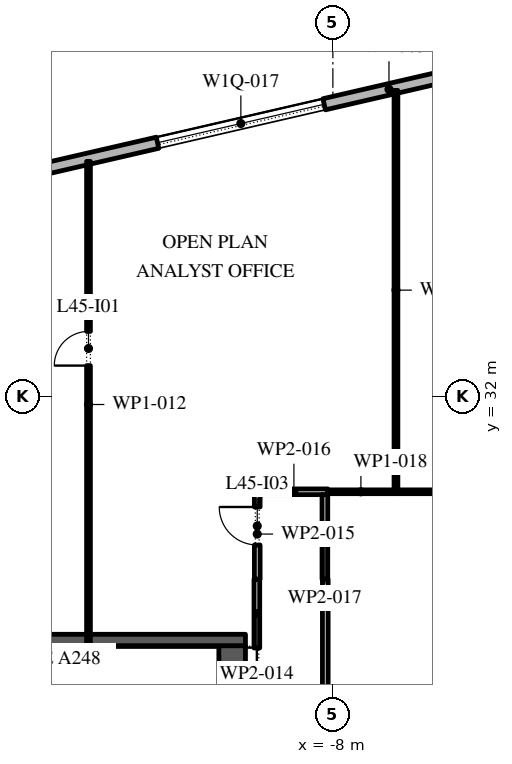
"""IFC4 building model, lengths in metres.
Left out: names, types, materials, properties, quantities, classifications, styles, units other than length and angle.
Written with IfcOpenShell. Run it as: python <this file> out.ifc"""

import sys

from ifc_helpers import new_model, si_unit, direction, frame, frame_2d, origin, place, context, subcontext, project, spatial, rectangle, extrude, element, fill, save


model = new_model("IFC4")
c1 = context("Model", 3, precision=1e-05, world=origin(), true_north=direction((0.0, 1.0)))
c2 = subcontext(c1, "Body", "Model", "MODEL_VIEW")
j1 = project(units=[si_unit("LENGTHUNIT", "METRE"), si_unit("PLANEANGLEUNIT", "RADIAN")], contexts=[c1])
p1 = place(None, origin())
s1 = spatial("IfcSite", under=j1, at=p1, CompositionType="ELEMENT")
p2 = place(p1, origin())
s2 = spatial("IfcBuilding", under=s1, at=p2, CompositionType="ELEMENT")
p3 = place(p2, frame((0.0, 0.0, 205.2)))
s3 = spatial("IfcBuildingStorey", under=s2, at=p3, CompositionType="ELEMENT", Elevation=205.2)
p4 = place(p3, frame((17.592, 45.657, 0.0), z_axis=(0.0, 0.0, 1.0), x_axis=(-0.974370243697, -0.224950279389, 0.0)))
e1 = element("IfcWall", 1, at=p4, inside=s3, PredefinedType="STANDARD", context=c2, shape_type="SweptSolid", body=[
    extrude(rectangle(XDim=49.5, YDim=0.3, at=frame_2d((24.75, 0.0))), origin(), (0.0, 0.0, 1.0), 4.0),
])
p5 = place(p4, frame((2.8, 0.0, 0.0)))
e2 = element("IfcOpeningElement", 2, at=p5, cuts=e1, PredefinedType="OPENING", context=c2, shape_type="SweptSolid", body=[
    extrude(rectangle(XDim=2.4, YDim=3.5, at=frame_2d((1.2, 1.75))), frame((0.0, 0.16, 0.0), z_axis=(0.0, -1.0, 0.0), x_axis=(1.0, 0.0, 0.0)), (0.0, 0.0, 1.0), 0.32),
])
p6 = place(p4, frame((9.9, 0.0, 0.45)))
e3 = element("IfcOpeningElement", 3, at=p6, cuts=e1, PredefinedType="OPENING", context=c2, shape_type="SweptSolid", body=[
    extrude(rectangle(XDim=4.5, YDim=2.45, at=frame_2d((2.25, 1.225))), frame((0.0, 0.16, 0.0), z_axis=(0.0, -1.0, 0.0), x_axis=(1.0, 0.0, 0.0)), (0.0, 0.0, 1.0), 0.32),
])
p7 = place(p4, frame((18.2, 0.0, 0.45)))
e4 = element("IfcOpeningElement", 4, at=p7, cuts=e1, PredefinedType="OPENING", context=c2, shape_type="SweptSolid", body=[
    extrude(rectangle(XDim=4.5, YDim=2.45, at=frame_2d((2.25, 1.225))), frame((0.0, 0.16, 0.0), z_axis=(0.0, -1.0, 0.0), x_axis=(1.0, 0.0, 0.0)), (0.0, 0.0, 1.0), 0.32),
])
p8 = place(p4, frame((26.5, 0.0, 0.45)))
e5 = element("IfcOpeningElement", 5, at=p8, cuts=e1, PredefinedType="OPENING", context=c2, shape_type="SweptSolid", body=[
    extrude(rectangle(XDim=4.5, YDim=2.45, at=frame_2d((2.25, 1.225))), frame((0.0, 0.16, 0.0), z_axis=(0.0, -1.0, 0.0), x_axis=(1.0, 0.0, 0.0)), (0.0, 0.0, 1.0), 0.32),
])
p9 = place(p4, frame((35.85, 0.0, 0.0)))
e6 = element("IfcOpeningElement", 6, at=p9, cuts=e1, PredefinedType="OPENING", context=c2, shape_type="SweptSolid", body=[
    extrude(rectangle(XDim=2.4, YDim=3.5, at=frame_2d((1.2, 1.75))), frame((0.0, 0.16, 0.0), z_axis=(0.0, -1.0, 0.0), x_axis=(1.0, 0.0, 0.0)), (0.0, 0.0, 1.0), 0.32),
])
p10 = place(p4, frame((43.1, 0.0, 0.45)))
e7 = element("IfcOpeningElement", 7, at=p10, cuts=e1, PredefinedType="OPENING", context=c2, shape_type="SweptSolid", body=[
    extrude(rectangle(XDim=4.5, YDim=2.575, at=frame_2d((2.25, 1.288))), frame((0.0, 0.16, 0.0), z_axis=(0.0, -1.0, 0.0), x_axis=(1.0, 0.0, 0.0)), (0.0, 0.0, 1.0), 0.32),
])
p11 = place(p3, frame((-10.65, -2.45, 0.0), z_axis=(0.0, 0.0, 1.0), x_axis=(0.0, 1.0, 0.0)))
e8 = element("IfcWall", 8, at=p11, inside=s3, PredefinedType="SHEAR", context=c2, shape_type="SweptSolid", body=[
    extrude(rectangle(XDim=27.9, YDim=0.7, at=frame_2d((13.95, 0.0))), origin(), (0.0, 0.0, 1.0), 4.0),
])
p12 = place(p11, frame((23.65, 0.0, 0.0)))
e9 = element("IfcOpeningElement", 9, at=p12, cuts=e8, PredefinedType="OPENING", context=c2, shape_type="SweptSolid", body=[
    extrude(rectangle(XDim=2.4, YDim=2.1, at=frame_2d((1.2, 1.05))), frame((0.0, 0.36, 0.0), z_axis=(0.0, -1.0, 0.0), x_axis=(1.0, 0.0, 0.0)), (0.0, 0.0, 1.0), 0.72),
])
p13 = place(p11, frame((1.087, 0.0, 0.0)))
e10 = element("IfcOpeningElement", 10, at=p13, cuts=e8, PredefinedType="OPENING", context=c2, shape_type="SweptSolid", body=[
    extrude(rectangle(XDim=0.9, YDim=2.1, at=frame_2d((0.45, 1.05))), frame((0.0, 0.36, 0.0), z_axis=(0.0, -1.0, 0.0), x_axis=(1.0, 0.0, 0.0)), (0.0, 0.0, 1.0), 0.72),
])
p14 = place(p11, frame((4.262, 0.0, 0.0)))
e11 = element("IfcOpeningElement", 11, at=p14, cuts=e8, PredefinedType="OPENING", context=c2, shape_type="SweptSolid", body=[
    extrude(rectangle(XDim=1.0, YDim=2.1, at=frame_2d((0.5, 1.05))), frame((0.0, 0.36, 0.0), z_axis=(0.0, -1.0, 0.0), x_axis=(1.0, 0.0, 0.0)), (0.0, 0.0, 1.0), 0.72),
])
p15 = place(p3, frame((-21.7, 25.6, 0.0), z_axis=(0.0, 0.0, 1.0), x_axis=(1.0, 0.0, 0.0)))
e12 = element("IfcWall", 12, at=p15, inside=s3, PredefinedType="SHEAR", context=c2, shape_type="SweptSolid", body=[
    extrude(rectangle(XDim=11.4, YDim=0.3, at=frame_2d((5.7, 0.0))), origin(), (0.0, 0.0, 1.0), 4.0),
])
p16 = place(p3, frame((-14.43, 38.193, 0.0), z_axis=(0.0, 0.0, 1.0), x_axis=(0.0, -1.0, 0.0)))
e13 = element("IfcWall", 13, at=p16, inside=s3, PredefinedType="PARTITIONING", context=c2, shape_type="SweptSolid", body=[
    extrude(rectangle(XDim=12.793, YDim=0.1, at=frame_2d((6.396, 0.0))), origin(), (0.0, 0.0, 1.0), 4.0),
])
p17 = place(p16, frame((4.473, 0.0, 0.0)))
e14 = element("IfcOpeningElement", 14, at=p17, cuts=e13, PredefinedType="OPENING", context=c2, shape_type="SweptSolid", body=[
    extrude(rectangle(XDim=0.9, YDim=2.1, at=frame_2d((0.45, 1.05))), frame((0.0, 0.06, 0.0), z_axis=(0.0, -1.0, 0.0), x_axis=(1.0, 0.0, 0.0)), (0.0, 0.0, 1.0), 0.12),
])
p18 = place(p3, frame((-10.0, 25.39, 0.0), z_axis=(0.0, 0.0, 1.0), x_axis=(0.0, 1.0, 0.0)))
e15 = element("IfcWall", 15, at=p18, inside=s3, PredefinedType="PARTITIONING", context=c2, shape_type="SweptSolid", body=[
    extrude(rectangle(XDim=1.81, YDim=0.15, at=frame_2d((0.905, 0.0))), origin(), (0.0, 0.0, 1.0), 4.0),
])
p19 = place(p3, frame((-9.99, 27.2, 0.0), z_axis=(0.0, 0.0, 1.0), x_axis=(0.0, 1.0, 0.0)))
e16 = element("IfcWall", 16, at=p19, inside=s3, PredefinedType="PARTITIONING", context=c2, shape_type="SweptSolid", body=[
    extrude(rectangle(XDim=2.375, YDim=0.15, at=frame_2d((1.188, 0.0))), origin(), (0.0, 0.0, 1.0), 4.0),
])
p20 = place(p19, frame((0.9, 0.0, 0.0)))
e17 = element("IfcOpeningElement", 17, at=p20, cuts=e16, PredefinedType="OPENING", context=c2, shape_type="SweptSolid", body=[
    extrude(rectangle(XDim=1.0, YDim=2.1, at=frame_2d((0.5, 1.05))), frame((0.0, 0.085, 0.0), z_axis=(0.0, -1.0, 0.0), x_axis=(1.0, 0.0, 0.0)), (0.0, 0.0, 1.0), 0.17),
])
p21 = place(p3, frame((-9.915, 29.5, 0.0), z_axis=(0.0, 0.0, 1.0), x_axis=(1.0, 0.0, 0.0)))
e18 = element("IfcWall", 18, at=p21, inside=s3, PredefinedType="PARTITIONING", context=c2, shape_type="SweptSolid", body=[
    extrude(rectangle(XDim=1.78, YDim=0.15, at=frame_2d((0.89, 0.0))), origin(), (0.0, 0.0, 1.0), 4.0),
])
p22 = place(p3, frame((-8.21, 29.425, 0.0), z_axis=(0.0, 0.0, 1.0), x_axis=(0.0, -1.0, 0.0)))
e19 = element("IfcWall", 19, at=p22, inside=s3, PredefinedType="PARTITIONING", context=c2, shape_type="SweptSolid", body=[
    extrude(rectangle(XDim=2.225, YDim=0.15, at=frame_2d((1.113, 0.0))), origin(), (0.0, 0.0, 1.0), 4.0),
])
p23 = place(p3, frame((-8.135, 29.5, 0.0), z_axis=(0.0, 0.0, 1.0), x_axis=(1.0, 0.0, 0.0)))
e20 = element("IfcWall", 20, at=p23, inside=s3, PredefinedType="PARTITIONING", context=c2, shape_type="SweptSolid", body=[
    extrude(rectangle(XDim=1.745, YDim=0.1, at=frame_2d((0.873, 0.0))), origin(), (0.0, 0.0, 1.0), 4.0),
])
p24 = place(p3, frame((-8.2, 27.2, 0.0), z_axis=(0.0, 0.0, 1.0), x_axis=(0.0, -1.0, 0.0)))
e21 = element("IfcWall", 21, at=p24, inside=s3, PredefinedType="PARTITIONING", context=c2, shape_type="SweptSolid", body=[
    extrude(rectangle(XDim=8.125, YDim=0.15, at=frame_2d((4.062, 0.0))), origin(), (0.0, 0.0, 1.0), 4.0),
])
p25 = place(p3, frame((-6.39, 29.5, 0.0), z_axis=(0.0, 0.0, 1.0), x_axis=(1.0, 0.0, 0.0)))
e22 = element("IfcWall", 22, at=p25, inside=s3, PredefinedType="PARTITIONING", context=c2, shape_type="SweptSolid", body=[
    extrude(rectangle(XDim=5.475, YDim=0.1, at=frame_2d((2.737, 0.0))), origin(), (0.0, 0.0, 1.0), 4.0),
])
p26 = place(p3, frame((-6.34, 40.061, 0.0), z_axis=(0.0, 0.0, 1.0), x_axis=(0.0, -1.0, 0.0)))
e23 = element("IfcWall", 23, at=p26, inside=s3, PredefinedType="PARTITIONING", context=c2, shape_type="SweptSolid", body=[
    extrude(rectangle(XDim=10.511, YDim=0.1, at=frame_2d((5.255, 0.0))), origin(), (0.0, 0.0, 1.0), 4.0),
])
p27 = place(p8, origin())
e24 = element("IfcWindow", 24, at=p27, inside=s3, PartitioningType="DOUBLE_PANEL_VERTICAL", PredefinedType="WINDOW", context=c2, shape_type="SweptSolid", body=[
    extrude(rectangle(XDim=4.5, YDim=2.45, at=frame_2d((2.25, 1.225))), frame((0.0, 0.03, 0.0), z_axis=(0.0, -1.0, 0.0), x_axis=(1.0, 0.0, 0.0)), (0.0, 0.0, 1.0), 0.06),
])
fill(e5, e24)
p28 = place(p17, frame((0.9, 0.0, 0.0), z_axis=(0.0, 0.0, 1.0), x_axis=(-1.0, 0.0, 0.0)))
e25 = element("IfcDoor", 25, at=p28, inside=s3, OperationType="SINGLE_SWING_RIGHT", PredefinedType="DOOR", context=c2, shape_type="SweptSolid", body=[
    extrude(rectangle(XDim=0.9, YDim=2.1, at=frame_2d((0.45, 1.05))), frame((0.0, 0.025, 0.0), z_axis=(0.0, -1.0, 0.0), x_axis=(1.0, 0.0, 0.0)), (0.0, 0.0, 1.0), 0.05),
])
fill(e14, e25)
p29 = place(p20, origin())
e26 = element("IfcDoor", 26, at=p29, inside=s3, OperationType="SINGLE_SWING_LEFT", PredefinedType="DOOR", context=c2, shape_type="SweptSolid", body=[
    extrude(rectangle(XDim=1.0, YDim=2.1, at=frame_2d((0.5, 1.05))), frame((0.0, 0.025, 0.0), z_axis=(0.0, -1.0, 0.0), x_axis=(1.0, 0.0, 0.0)), (0.0, 0.0, 1.0), 0.05),
])
fill(e17, e26)
save(model, sys.argv[1])
